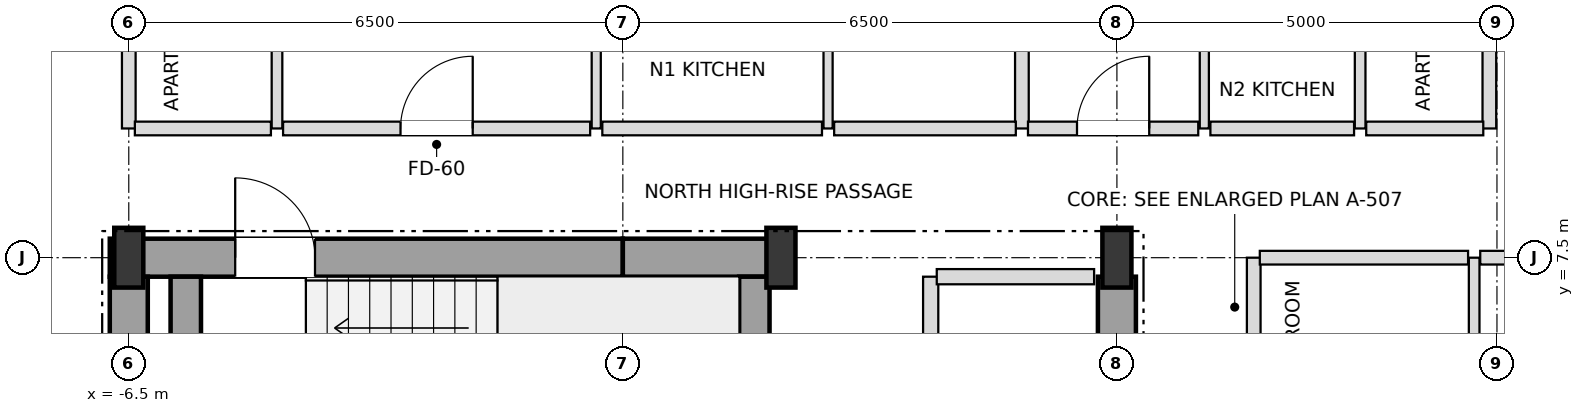
"""IFC4 building model, lengths in metres.
Left out: names, types, materials, properties, quantities, classifications, styles, units other than length and angle.
Written with IfcOpenShell. Run it as: python <this file> out.ifc"""

import sys

from ifc_helpers import new_model, si_unit, direction, frame, frame_2d, origin, origin_2d, place, context, subcontext, project, spatial, rectangle, i_section, extrude, element, fill, save


model = new_model("IFC4")
c1 = context("Model", 3, precision=1e-05, world=origin(), true_north=direction((0.0, 1.0)))
c2 = subcontext(c1, "Body", "Model", "MODEL_VIEW")
j1 = project(units=[si_unit("LENGTHUNIT", "METRE"), si_unit("PLANEANGLEUNIT", "RADIAN")], contexts=[c1])
p1 = place(None, origin())
s1 = spatial("IfcSite", under=j1, at=p1, CompositionType="ELEMENT")
p2 = place(p1, origin())
s2 = spatial("IfcBuilding", under=s1, at=p2, CompositionType="ELEMENT")
p3 = place(p2, frame((0.0, 0.0, 229.5)))
s3 = spatial("IfcBuildingStorey", under=s2, at=p3, CompositionType="ELEMENT", Elevation=229.5)
for number, where, z_axis, x_axis in (
    (1, (-6.5, 7.5, 0.0), (0.0, 0.0, 1.0), (1.0, 0.0, 0.0)),
    (2, (2.08, 7.5, 0.0), (0.0, 0.0, 1.0), (1.0, 0.0, 0.0)),
    (3, (6.5, 7.5, 0.0), (0.0, 0.0, 1.0), (1.0, 0.0, 0.0)),
):
    element("IfcColumn", number, at=place(p3, frame(where, z_axis=z_axis, x_axis=x_axis)), inside=s3, PredefinedType="COLUMN", context=c2, shape_type="SweptSolid", body=[
        extrude(i_section(OverallWidth=0.382, OverallDepth=0.786, WebThickness=0.02, FlangeThickness=0.033, at=origin_2d()), origin(), (0.0, 0.0, 1.0), 3.6),
    ])
p4 = place(p3, frame((-6.75, 7.5, 0.0), z_axis=(0.0, 0.0, 1.0), x_axis=(1.0, 0.0, 0.0)))
e4 = element("IfcWall", 4, at=p4, inside=s3, PredefinedType="SHEAR", context=c2, shape_type="SweptSolid", body=[
    extrude(rectangle(XDim=6.75, YDim=0.5, at=frame_2d((3.375, 0.0))), origin(), (0.0, 0.0, 1.0), 3.38),
])
p5 = place(p4, frame((1.65, 0.0, 0.0)))
e5 = element("IfcOpeningElement", 5, at=p5, cuts=e4, PredefinedType="OPENING", context=c2, shape_type="SweptSolid", body=[
    extrude(rectangle(XDim=1.05, YDim=2.15, at=frame_2d((0.525, 1.075))), frame((0.0, 0.26, 0.0), z_axis=(0.0, -1.0, 0.0), x_axis=(1.0, 0.0, 0.0)), (0.0, 0.0, 1.0), 0.52),
])
p6 = place(p3, frame((0.0, 7.5, 0.0), z_axis=(0.0, 0.0, 1.0), x_axis=(1.0, 0.0, 0.0)))
e6 = element("IfcWall", 6, at=p6, inside=s3, PredefinedType="SHEAR", context=c2, shape_type="SweptSolid", body=[
    extrude(rectangle(XDim=2.08, YDim=0.5, at=frame_2d((1.04, 0.0))), origin(), (0.0, 0.0, 1.0), 3.38),
])
for number, where, z_axis, x_axis in (
    (7, (-6.5, 3.95, 0.0), (0.0, 0.0, 1.0), (0.0, 1.0, 0.0)),
    (8, (6.5, 3.95, 0.0), (0.0, 0.0, 1.0), (0.0, 1.0, 0.0)),
):
    element("IfcWall", number, at=place(p3, frame(where, z_axis=z_axis, x_axis=x_axis)), inside=s3, PredefinedType="SHEAR", context=c2, shape_type="SweptSolid", body=[
        extrude(rectangle(XDim=3.3, YDim=0.5, at=frame_2d((1.65, 0.0))), origin(), (0.0, 0.0, 1.0), 3.38),
    ])
for number, where, z_axis, x_axis in (
    (9, (1.73, 3.95, 0.0), (0.0, 0.0, 1.0), (0.0, 1.0, 0.0)),
    (10, (-5.75, 3.95, 0.0), (0.0, 0.0, 1.0), (0.0, 1.0, 0.0)),
):
    element("IfcWall", number, at=place(p3, frame(where, z_axis=z_axis, x_axis=x_axis)), inside=s3, PredefinedType="SHEAR", context=c2, shape_type="SweptSolid", body=[
        extrude(rectangle(XDim=3.3, YDim=0.4, at=frame_2d((1.65, 0.0))), origin(), (0.0, 0.0, 1.0), 3.38),
    ])
p7 = place(p3, frame((-6.5, 9.2, 0.0), z_axis=(0.0, 0.0, 1.0), x_axis=(0.0, 1.0, 0.0)))
e11 = element("IfcWall", 11, at=p7, inside=s3, PredefinedType="PARTITIONING", context=c2, shape_type="SweptSolid", body=[
    extrude(rectangle(XDim=10.7, YDim=0.18, at=frame_2d((5.35, 0.0))), origin(), (0.0, 0.0, 1.0), 2.826),
])
p8 = place(p3, frame((-4.55, 9.2, 0.0), z_axis=(0.0, 0.0, 1.0), x_axis=(0.0, 1.0, 0.0)))
e12 = element("IfcWall", 12, at=p8, inside=s3, PredefinedType="PARTITIONING", context=c2, shape_type="SweptSolid", body=[
    extrude(rectangle(XDim=4.7, YDim=0.14, at=frame_2d((2.35, 0.0))), origin(), (0.0, 0.0, 1.0), 3.38),
])
p9 = place(p8, frame((1.9, 0.0, 0.0)))
e13 = element("IfcOpeningElement", 13, at=p9, cuts=e12, PredefinedType="OPENING", context=c2, shape_type="SweptSolid", body=[
    extrude(rectangle(XDim=0.9, YDim=2.1, at=frame_2d((0.45, 1.05))), frame((0.0, 0.08, 0.0), z_axis=(0.0, -1.0, 0.0), x_axis=(1.0, 0.0, 0.0)), (0.0, 0.0, 1.0), 0.16),
])
p10 = place(p3, frame((-0.35, 9.2, 0.0), z_axis=(0.0, 0.0, 1.0), x_axis=(0.0, 1.0, 0.0)))
e14 = element("IfcWall", 14, at=p10, inside=s3, PredefinedType="PARTITIONING", context=c2, shape_type="SweptSolid", body=[
    extrude(rectangle(XDim=4.7, YDim=0.12, at=frame_2d((2.35, 0.0))), origin(), (0.0, 0.0, 1.0), 3.38),
])
p11 = place(p10, frame((1.875, 0.0, 0.0)))
e15 = element("IfcOpeningElement", 15, at=p11, cuts=e14, PredefinedType="OPENING", context=c2, shape_type="SweptSolid", body=[
    extrude(rectangle(XDim=0.95, YDim=2.1, at=frame_2d((0.475, 1.05))), frame((0.0, 0.07, 0.0), z_axis=(0.0, -1.0, 0.0), x_axis=(1.0, 0.0, 0.0)), (0.0, 0.0, 1.0), 0.14),
])
p12 = place(p3, frame((2.7, 9.2, 0.0), z_axis=(0.0, 0.0, 1.0), x_axis=(0.0, 1.0, 0.0)))
e16 = element("IfcWall", 16, at=p12, inside=s3, PredefinedType="PARTITIONING", context=c2, shape_type="SweptSolid", body=[
    extrude(rectangle(XDim=4.7, YDim=0.12, at=frame_2d((2.35, 0.0))), origin(), (0.0, 0.0, 1.0), 3.38),
])
p13 = place(p12, frame((1.9, 0.0, 0.0)))
e17 = element("IfcOpeningElement", 17, at=p13, cuts=e16, PredefinedType="OPENING", context=c2, shape_type="SweptSolid", body=[
    extrude(rectangle(XDim=0.9, YDim=2.1, at=frame_2d((0.45, 1.05))), frame((0.0, 0.07, 0.0), z_axis=(0.0, -1.0, 0.0), x_axis=(1.0, 0.0, 0.0)), (0.0, 0.0, 1.0), 0.14),
])
p14 = place(p3, frame((4.05, 4.2, 0.0), z_axis=(0.0, 0.0, 1.0), x_axis=(0.0, 1.0, 0.0)))
e18 = element("IfcWall", 18, at=p14, inside=s3, PredefinedType="SOLIDWALL", context=c2, shape_type="SweptSolid", body=[
    extrude(rectangle(XDim=3.05, YDim=0.2, at=frame_2d((1.525, 0.0))), origin(), (0.0, 0.0, 1.0), 3.38),
])
p15 = place(p14, frame((0.975, 0.0, 0.0)))
e19 = element("IfcOpeningElement", 19, at=p15, cuts=e18, PredefinedType="OPENING", context=c2, shape_type="SweptSolid", body=[
    extrude(rectangle(XDim=0.95, YDim=2.15, at=frame_2d((0.475, 1.075))), frame((0.0, 0.11, 0.0), z_axis=(0.0, -1.0, 0.0), x_axis=(1.0, 0.0, 0.0)), (0.0, 0.0, 1.0), 0.22),
])
p16 = place(p3, frame((5.25, 9.2, 0.0), z_axis=(0.0, 0.0, 1.0), x_axis=(0.0, 1.0, 0.0)))
e20 = element("IfcWall", 20, at=p16, inside=s3, PredefinedType="PARTITIONING", context=c2, shape_type="SweptSolid", body=[
    extrude(rectangle(XDim=10.7, YDim=0.18, at=frame_2d((5.35, 0.0))), origin(), (0.0, 0.0, 1.0), 3.018),
])
p17 = place(p3, frame((7.65, 9.2, 0.0), z_axis=(0.0, 0.0, 1.0), x_axis=(0.0, 1.0, 0.0)))
e21 = element("IfcWall", 21, at=p17, inside=s3, PredefinedType="PARTITIONING", context=c2, shape_type="SweptSolid", body=[
    extrude(rectangle(XDim=4.7, YDim=0.12, at=frame_2d((2.35, 0.0))), origin(), (0.0, 0.0, 1.0), 2.826),
])
p18 = place(p17, frame((1.875, 0.0, 0.0)))
e22 = element("IfcOpeningElement", 22, at=p18, cuts=e21, PredefinedType="OPENING", context=c2, shape_type="SweptSolid", body=[
    extrude(rectangle(XDim=0.95, YDim=2.1, at=frame_2d((0.475, 1.05))), frame((0.0, 0.07, 0.0), z_axis=(0.0, -1.0, 0.0), x_axis=(1.0, 0.0, 0.0)), (0.0, 0.0, 1.0), 0.14),
])
p19 = place(p3, frame((8.3, -7.5, 0.0), z_axis=(0.0, 0.0, 1.0), x_axis=(0.0, 1.0, 0.0)))
e23 = element("IfcWall", 23, at=p19, inside=s3, PredefinedType="PARTITIONING", context=c2, shape_type="SweptSolid", body=[
    extrude(rectangle(XDim=15.0, YDim=0.18, at=frame_2d((7.5, 0.0))), origin(), (0.0, 0.0, 1.0), 3.38),
])
p20 = place(p19, frame((2.355, 0.0, 0.0)))
e24 = element("IfcOpeningElement", 24, at=p20, cuts=e23, PredefinedType="OPENING", context=c2, shape_type="SweptSolid", body=[
    extrude(rectangle(XDim=0.95, YDim=2.15, at=frame_2d((0.475, 1.075))), frame((0.0, 0.1, 0.0), z_axis=(0.0, -1.0, 0.0), x_axis=(1.0, 0.0, 0.0)), (0.0, 0.0, 1.0), 0.2),
])
p21 = place(p3, frame((9.7, 9.2, 0.0), z_axis=(0.0, 0.0, 1.0), x_axis=(0.0, 1.0, 0.0)))
e25 = element("IfcWall", 25, at=p21, inside=s3, PredefinedType="PARTITIONING", context=c2, shape_type="SweptSolid", body=[
    extrude(rectangle(XDim=4.7, YDim=0.14, at=frame_2d((2.35, 0.0))), origin(), (0.0, 0.0, 1.0), 2.826),
])
p22 = place(p21, frame((1.9, 0.0, 0.0)))
e26 = element("IfcOpeningElement", 26, at=p22, cuts=e25, PredefinedType="OPENING", context=c2, shape_type="SweptSolid", body=[
    extrude(rectangle(XDim=0.9, YDim=2.1, at=frame_2d((0.45, 1.05))), frame((0.0, 0.08, 0.0), z_axis=(0.0, -1.0, 0.0), x_axis=(1.0, 0.0, 0.0)), (0.0, 0.0, 1.0), 0.16),
])
p23 = place(p3, frame((11.2, -7.5, 0.0), z_axis=(0.0, 0.0, 1.0), x_axis=(0.0, 1.0, 0.0)))
e27 = element("IfcWall", 27, at=p23, inside=s3, PredefinedType="PARTITIONING", context=c2, shape_type="SweptSolid", body=[
    extrude(rectangle(XDim=15.0, YDim=0.14, at=frame_2d((7.5, 0.0))), origin(), (0.0, 0.0, 1.0), 3.38),
])
p24 = place(p23, frame((3.475, 0.0, 0.0)))
e28 = element("IfcOpeningElement", 28, at=p24, cuts=e27, PredefinedType="OPENING", context=c2, shape_type="SweptSolid", body=[
    extrude(rectangle(XDim=0.95, YDim=2.1, at=frame_2d((0.475, 1.05))), frame((0.0, 0.08, 0.0), z_axis=(0.0, -1.0, 0.0), x_axis=(1.0, 0.0, 0.0)), (0.0, 0.0, 1.0), 0.16),
])
p25 = place(p3, frame((11.4, 9.2, 0.0), z_axis=(0.0, 0.0, 1.0), x_axis=(0.0, 1.0, 0.0)))
e29 = element("IfcWall", 29, at=p25, inside=s3, PredefinedType="PARTITIONING", context=c2, shape_type="SweptSolid", body=[
    extrude(rectangle(XDim=5.07, YDim=0.18, at=frame_2d((2.535, 0.0))), origin(), (0.0, 0.0, 1.0), 2.748),
])
p26 = place(p3, frame((4.13, 7.25, 0.0), z_axis=(0.0, 0.0, 1.0), x_axis=(1.0, 0.0, 0.0)))
e30 = element("IfcWall", 30, at=p26, inside=s3, PredefinedType="SOLIDWALL", context=c2, shape_type="SweptSolid", body=[
    extrude(rectangle(XDim=2.07, YDim=0.2, at=frame_2d((1.035, 0.0))), origin(), (0.0, 0.0, 1.0), 3.38),
])
p27 = place(p3, frame((8.38, 7.5, 0.0), z_axis=(0.0, 0.0, 1.0), x_axis=(1.0, 0.0, 0.0)))
e31 = element("IfcWall", 31, at=p27, inside=s3, PredefinedType="PARTITIONING", context=c2, shape_type="SweptSolid", body=[
    extrude(rectangle(XDim=2.74, YDim=0.18, at=frame_2d((1.37, 0.0))), origin(), (0.0, 0.0, 1.0), 2.826),
])
p28 = place(p3, frame((11.28, 7.5, 0.0), z_axis=(0.0, 0.0, 1.0), x_axis=(1.0, 0.0, 0.0)))
e32 = element("IfcWall", 32, at=p28, inside=s3, PredefinedType="PARTITIONING", context=c2, shape_type="SweptSolid", body=[
    extrude(rectangle(XDim=5.62, YDim=0.18, at=frame_2d((2.81, 0.0))), origin(), (0.0, 0.0, 1.0), 2.826),
])
p29 = place(p3, frame((-6.42, 9.2, 0.0), z_axis=(0.0, 0.0, 1.0), x_axis=(1.0, 0.0, 0.0)))
e33 = element("IfcWall", 33, at=p29, inside=s3, PredefinedType="PARTITIONING", context=c2, shape_type="SweptSolid", body=[
    extrude(rectangle(XDim=1.79, YDim=0.18, at=frame_2d((0.895, 0.0))), origin(), (0.0, 0.0, 1.0), 3.38),
])
p30 = place(p3, frame((-4.47, 9.2, 0.0), z_axis=(0.0, 0.0, 1.0), x_axis=(1.0, 0.0, 0.0)))
e34 = element("IfcWall", 34, at=p30, inside=s3, PredefinedType="PARTITIONING", context=c2, shape_type="SweptSolid", body=[
    extrude(rectangle(XDim=4.04, YDim=0.18, at=frame_2d((2.02, 0.0))), origin(), (0.0, 0.0, 1.0), 3.38),
])
p31 = place(p30, frame((1.545, 0.0, 0.0)))
e35 = element("IfcOpeningElement", 35, at=p31, cuts=e34, PredefinedType="OPENING", context=c2, shape_type="SweptSolid", body=[
    extrude(rectangle(XDim=0.95, YDim=2.15, at=frame_2d((0.475, 1.075))), frame((0.0, 0.1, 0.0), z_axis=(0.0, -1.0, 0.0), x_axis=(1.0, 0.0, 0.0)), (0.0, 0.0, 1.0), 0.2),
])
p32 = place(p3, frame((-0.27, 9.2, 0.0), z_axis=(0.0, 0.0, 1.0), x_axis=(1.0, 0.0, 0.0)))
e36 = element("IfcWall", 36, at=p32, inside=s3, PredefinedType="PARTITIONING", context=c2, shape_type="SweptSolid", body=[
    extrude(rectangle(XDim=2.89, YDim=0.18, at=frame_2d((1.445, 0.0))), origin(), (0.0, 0.0, 1.0), 3.38),
])
p33 = place(p3, frame((2.78, 9.2, 0.0), z_axis=(0.0, 0.0, 1.0), x_axis=(1.0, 0.0, 0.0)))
e37 = element("IfcWall", 37, at=p33, inside=s3, PredefinedType="PARTITIONING", context=c2, shape_type="SweptSolid", body=[
    extrude(rectangle(XDim=2.39, YDim=0.18, at=frame_2d((1.195, 0.0))), origin(), (0.0, 0.0, 1.0), 3.38),
])
p34 = place(p3, frame((5.33, 9.2, 0.0), z_axis=(0.0, 0.0, 1.0), x_axis=(1.0, 0.0, 0.0)))
e38 = element("IfcWall", 38, at=p34, inside=s3, PredefinedType="PARTITIONING", context=c2, shape_type="SweptSolid", body=[
    extrude(rectangle(XDim=2.24, YDim=0.18, at=frame_2d((1.12, 0.0))), origin(), (0.0, 0.0, 1.0), 2.826),
])
p35 = place(p34, frame((0.645, 0.0, 0.0)))
e39 = element("IfcOpeningElement", 39, at=p35, cuts=e38, PredefinedType="OPENING", context=c2, shape_type="SweptSolid", body=[
    extrude(rectangle(XDim=0.95, YDim=2.15, at=frame_2d((0.475, 1.075))), frame((0.0, 0.1, 0.0), z_axis=(0.0, -1.0, 0.0), x_axis=(1.0, 0.0, 0.0)), (0.0, 0.0, 1.0), 0.2),
])
p36 = place(p3, frame((7.73, 9.2, 0.0), z_axis=(0.0, 0.0, 1.0), x_axis=(1.0, 0.0, 0.0)))
e40 = element("IfcWall", 40, at=p36, inside=s3, PredefinedType="PARTITIONING", context=c2, shape_type="SweptSolid", body=[
    extrude(rectangle(XDim=1.89, YDim=0.18, at=frame_2d((0.945, 0.0))), origin(), (0.0, 0.0, 1.0), 3.38),
])
p37 = place(p3, frame((9.78, 9.2, 0.0), z_axis=(0.0, 0.0, 1.0), x_axis=(1.0, 0.0, 0.0)))
e41 = element("IfcWall", 41, at=p37, inside=s3, PredefinedType="PARTITIONING", context=c2, shape_type="SweptSolid", body=[
    extrude(rectangle(XDim=1.54, YDim=0.18, at=frame_2d((0.77, 0.0))), origin(), (0.0, 0.0, 1.0), 3.38),
])
p38 = place(p5, origin())
e42 = element("IfcDoor", 42, at=p38, inside=s3, OperationType="SINGLE_SWING_LEFT", PredefinedType="DOOR", context=c2, shape_type="SweptSolid", body=[
    extrude(rectangle(XDim=1.05, YDim=2.15, at=frame_2d((0.525, 1.075))), frame((0.0, 0.025, 0.0), z_axis=(0.0, -1.0, 0.0), x_axis=(1.0, 0.0, 0.0)), (0.0, 0.0, 1.0), 0.05),
])
fill(e5, e42)
p39 = place(p31, origin())
e43 = element("IfcDoor", 43, at=p39, inside=s3, OperationType="SINGLE_SWING_RIGHT", PredefinedType="DOOR", context=c2, shape_type="SweptSolid", body=[
    extrude(rectangle(XDim=0.95, YDim=2.15, at=frame_2d((0.475, 1.075))), frame((0.0, 0.025, 0.0), z_axis=(0.0, -1.0, 0.0), x_axis=(1.0, 0.0, 0.0)), (0.0, 0.0, 1.0), 0.05),
])
fill(e35, e43)
p40 = place(p35, origin())
e44 = element("IfcDoor", 44, at=p40, inside=s3, OperationType="SINGLE_SWING_RIGHT", PredefinedType="DOOR", context=c2, shape_type="SweptSolid", body=[
    extrude(rectangle(XDim=0.95, YDim=2.15, at=frame_2d((0.475, 1.075))), frame((0.0, 0.025, 0.0), z_axis=(0.0, -1.0, 0.0), x_axis=(1.0, 0.0, 0.0)), (0.0, 0.0, 1.0), 0.05),
])
fill(e39, e44)
save(model, sys.argv[1])
